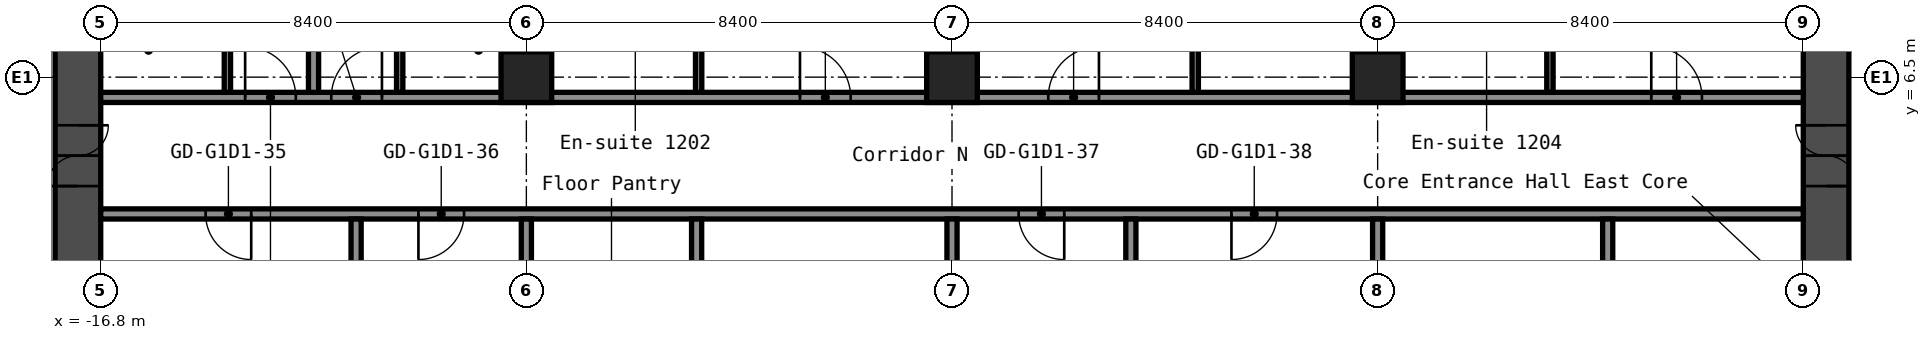
"""IFC4 building model, lengths in metres.
Left out: names, types, materials, properties, quantities, classifications, styles, units other than length and angle.
Written with IfcOpenShell. Run it as: python <this file> out.ifc"""

import sys

from ifc_helpers import new_model, si_unit, direction, frame, frame_2d, origin, origin_2d, place, context, subcontext, project, spatial, rectangle, hollow_rectangle, extrude, element, fill, save


model = new_model("IFC4")
c1 = context("Model", 3, precision=1e-05, world=origin(), true_north=direction((0.0, 1.0)))
c2 = subcontext(c1, "Body", "Model", "MODEL_VIEW")
j1 = project(units=[si_unit("LENGTHUNIT", "METRE"), si_unit("PLANEANGLEUNIT", "RADIAN")], contexts=[c1])
p1 = place(None, origin())
s1 = spatial("IfcSite", under=j1, at=p1, CompositionType="ELEMENT")
p2 = place(p1, origin())
s2 = spatial("IfcBuilding", under=s1, at=p2, CompositionType="ELEMENT")
p3 = place(p2, frame((0.0, 0.0, 45.4)))
s3 = spatial("IfcBuildingStorey", under=s2, at=p3, CompositionType="ELEMENT", Elevation=45.4)
for number, where, z_axis, x_axis in (
    (1, (-8.4, 6.5, 0.0), (0.0, 0.0, 1.0), (1.0, 0.0, 0.0)),
    (2, (0.0, 6.5, 0.0), (0.0, 0.0, 1.0), (1.0, 0.0, 0.0)),
    (3, (8.4, 6.5, 0.0), (0.0, 0.0, 1.0), (1.0, 0.0, 0.0)),
):
    element("IfcColumn", number, at=place(p3, frame(where, z_axis=z_axis, x_axis=x_axis)), inside=s3, PredefinedType="COLUMN", context=c2, shape_type="SweptSolid", body=[
        extrude(hollow_rectangle(XDim=1.0, YDim=1.0, WallThickness=0.04, at=origin_2d()), origin(), (0.0, 0.0, 1.0), 2.8),
    ])
p4 = place(p3, frame((-17.25, -8.4, 0.0), z_axis=(0.0, 0.0, 1.0), x_axis=(0.0, 1.0, 0.0)))
e4 = element("IfcWall", 4, at=p4, inside=s3, PredefinedType="SHEAR", context=c2, shape_type="SweptSolid", body=[
    extrude(rectangle(XDim=16.8, YDim=0.9, at=frame_2d((8.4, 0.0))), origin(), (0.0, 0.0, 1.0), 2.8),
])
p5 = place(p4, frame((12.75, 0.0, 0.0)))
e5 = element("IfcOpeningElement", 5, at=p5, cuts=e4, PredefinedType="OPENING", context=c2, shape_type="SweptSolid", body=[
    extrude(rectangle(XDim=1.2, YDim=2.1, at=frame_2d((0.6, 1.05))), frame((0.0, 0.46, 0.0), z_axis=(0.0, -1.0, 0.0), x_axis=(1.0, 0.0, 0.0)), (0.0, 0.0, 1.0), 0.92),
])
p6 = place(p4, frame((2.85, 0.0, 0.0)))
e6 = element("IfcOpeningElement", 6, at=p6, cuts=e4, PredefinedType="OPENING", context=c2, shape_type="SweptSolid", body=[
    extrude(rectangle(XDim=1.2, YDim=2.1, at=frame_2d((0.6, 1.05))), frame((0.0, 0.46, 0.0), z_axis=(0.0, -1.0, 0.0), x_axis=(1.0, 0.0, 0.0)), (0.0, 0.0, 1.0), 0.92),
])
p7 = place(p3, frame((17.25, -8.4, 0.0), z_axis=(0.0, 0.0, 1.0), x_axis=(0.0, 1.0, 0.0)))
e7 = element("IfcWall", 7, at=p7, inside=s3, PredefinedType="SHEAR", context=c2, shape_type="SweptSolid", body=[
    extrude(rectangle(XDim=16.8, YDim=0.9, at=frame_2d((8.4, 0.0))), origin(), (0.0, 0.0, 1.0), 2.8),
])
p8 = place(p7, frame((12.75, 0.0, 0.0)))
e8 = element("IfcOpeningElement", 8, at=p8, cuts=e7, PredefinedType="OPENING", context=c2, shape_type="SweptSolid", body=[
    extrude(rectangle(XDim=1.2, YDim=2.1, at=frame_2d((0.6, 1.05))), frame((0.0, 0.46, 0.0), z_axis=(0.0, -1.0, 0.0), x_axis=(1.0, 0.0, 0.0)), (0.0, 0.0, 1.0), 0.92),
])
p9 = place(p7, frame((2.85, 0.0, 0.0)))
e9 = element("IfcOpeningElement", 9, at=p9, cuts=e7, PredefinedType="OPENING", context=c2, shape_type="SweptSolid", body=[
    extrude(rectangle(XDim=1.2, YDim=2.1, at=frame_2d((0.6, 1.05))), frame((0.0, 0.46, 0.0), z_axis=(0.0, -1.0, 0.0), x_axis=(1.0, 0.0, 0.0)), (0.0, 0.0, 1.0), 0.92),
])
p10 = place(p3, frame((-16.8, 3.8, 0.0), z_axis=(0.0, 0.0, 1.0), x_axis=(1.0, 0.0, 0.0)))
e10 = element("IfcWall", 10, at=p10, inside=s3, PredefinedType="PARTITIONING", context=c2, shape_type="SweptSolid", body=[
    extrude(rectangle(XDim=33.6, YDim=0.2, at=frame_2d((16.8, 0.0))), origin(), (0.0, 0.0, 1.0), 2.8),
])
p11 = place(p10, frame((2.07, 0.0, 0.0)))
e11 = element("IfcOpeningElement", 11, at=p11, cuts=e10, PredefinedType="OPENING", context=c2, shape_type="SweptSolid", body=[
    extrude(rectangle(XDim=0.9, YDim=2.1, at=frame_2d((0.45, 1.05))), frame((0.0, 0.11, 0.0), z_axis=(0.0, -1.0, 0.0), x_axis=(1.0, 0.0, 0.0)), (0.0, 0.0, 1.0), 0.22),
])
p12 = place(p10, frame((6.27, 0.0, 0.0)))
e12 = element("IfcOpeningElement", 12, at=p12, cuts=e10, PredefinedType="OPENING", context=c2, shape_type="SweptSolid", body=[
    extrude(rectangle(XDim=0.9, YDim=2.1, at=frame_2d((0.45, 1.05))), frame((0.0, 0.11, 0.0), z_axis=(0.0, -1.0, 0.0), x_axis=(1.0, 0.0, 0.0)), (0.0, 0.0, 1.0), 0.22),
])
p13 = place(p10, frame((18.115, 0.0, 0.0)))
e13 = element("IfcOpeningElement", 13, at=p13, cuts=e10, PredefinedType="OPENING", context=c2, shape_type="SweptSolid", body=[
    extrude(rectangle(XDim=0.9, YDim=2.1, at=frame_2d((0.45, 1.05))), frame((0.0, 0.11, 0.0), z_axis=(0.0, -1.0, 0.0), x_axis=(1.0, 0.0, 0.0)), (0.0, 0.0, 1.0), 0.22),
])
p14 = place(p10, frame((22.315, 0.0, 0.0)))
e14 = element("IfcOpeningElement", 14, at=p14, cuts=e10, PredefinedType="OPENING", context=c2, shape_type="SweptSolid", body=[
    extrude(rectangle(XDim=0.9, YDim=2.1, at=frame_2d((0.45, 1.05))), frame((0.0, 0.11, 0.0), z_axis=(0.0, -1.0, 0.0), x_axis=(1.0, 0.0, 0.0)), (0.0, 0.0, 1.0), 0.22),
])
p15 = place(p3, frame((-16.8, 6.1, 0.0), z_axis=(0.0, 0.0, 1.0), x_axis=(1.0, 0.0, 0.0)))
e15 = element("IfcWall", 15, at=p15, inside=s3, PredefinedType="PARTITIONING", context=c2, shape_type="SweptSolid", body=[
    extrude(rectangle(XDim=33.6, YDim=0.2, at=frame_2d((16.8, 0.0))), origin(), (0.0, 0.0, 1.0), 2.8),
])
p16 = place(p15, frame((2.85, 0.0, 0.0)))
e16 = element("IfcOpeningElement", 16, at=p16, cuts=e15, PredefinedType="OPENING", context=c2, shape_type="SweptSolid", body=[
    extrude(rectangle(XDim=1.0, YDim=2.1, at=frame_2d((0.5, 1.05))), frame((0.0, 0.11, 0.0), z_axis=(0.0, -1.0, 0.0), x_axis=(1.0, 0.0, 0.0)), (0.0, 0.0, 1.0), 0.22),
])
p17 = place(p15, frame((4.55, 0.0, 0.0)))
e17 = element("IfcOpeningElement", 17, at=p17, cuts=e15, PredefinedType="OPENING", context=c2, shape_type="SweptSolid", body=[
    extrude(rectangle(XDim=1.0, YDim=2.1, at=frame_2d((0.5, 1.05))), frame((0.0, 0.11, 0.0), z_axis=(0.0, -1.0, 0.0), x_axis=(1.0, 0.0, 0.0)), (0.0, 0.0, 1.0), 0.22),
])
p18 = place(p15, frame((13.8, 0.0, 0.0)))
e18 = element("IfcOpeningElement", 18, at=p18, cuts=e15, PredefinedType="OPENING", context=c2, shape_type="SweptSolid", body=[
    extrude(rectangle(XDim=1.0, YDim=2.1, at=frame_2d((0.5, 1.05))), frame((0.0, 0.11, 0.0), z_axis=(0.0, -1.0, 0.0), x_axis=(1.0, 0.0, 0.0)), (0.0, 0.0, 1.0), 0.22),
])
p19 = place(p15, frame((18.7, 0.0, 0.0)))
e19 = element("IfcOpeningElement", 19, at=p19, cuts=e15, PredefinedType="OPENING", context=c2, shape_type="SweptSolid", body=[
    extrude(rectangle(XDim=1.0, YDim=2.1, at=frame_2d((0.5, 1.05))), frame((0.0, 0.11, 0.0), z_axis=(0.0, -1.0, 0.0), x_axis=(1.0, 0.0, 0.0)), (0.0, 0.0, 1.0), 0.22),
])
p20 = place(p15, frame((30.6, 0.0, 0.0)))
e20 = element("IfcOpeningElement", 20, at=p20, cuts=e15, PredefinedType="OPENING", context=c2, shape_type="SweptSolid", body=[
    extrude(rectangle(XDim=1.0, YDim=2.1, at=frame_2d((0.5, 1.05))), frame((0.0, 0.11, 0.0), z_axis=(0.0, -1.0, 0.0), x_axis=(1.0, 0.0, 0.0)), (0.0, 0.0, 1.0), 0.22),
])
p21 = place(p3, frame((-14.3, 6.2, 0.0), z_axis=(0.0, 0.0, 1.0), x_axis=(0.0, 1.0, 0.0)))
e21 = element("IfcWall", 21, at=p21, inside=s3, PredefinedType="PARTITIONING", context=c2, shape_type="SweptSolid", body=[
    extrude(rectangle(XDim=2.9, YDim=0.125, at=frame_2d((1.45, 0.0))), origin(), (0.0, 0.0, 1.0), 2.8),
])
p22 = place(p21, frame((1.5, 0.0, 0.0)))
e22 = element("IfcOpeningElement", 22, at=p22, cuts=e21, PredefinedType="OPENING", context=c2, shape_type="SweptSolid", body=[
    extrude(rectangle(XDim=0.8, YDim=2.1, at=frame_2d((0.4, 1.05))), frame((0.0, 0.073, 0.0), z_axis=(0.0, -1.0, 0.0), x_axis=(1.0, 0.0, 0.0)), (0.0, 0.0, 1.0), 0.145),
])
p23 = place(p3, frame((-12.6, 6.2, 0.0), z_axis=(0.0, 0.0, 1.0), x_axis=(0.0, 1.0, 0.0)))
e23 = element("IfcWall", 23, at=p23, inside=s3, PredefinedType="PARTITIONING", context=c2, shape_type="SweptSolid", body=[
    extrude(rectangle(XDim=14.1, YDim=0.2, at=frame_2d((7.05, 0.0))), origin(), (0.0, 0.0, 1.0), 2.8),
])
p24 = place(p3, frame((-11.76, -3.7, 0.0), z_axis=(0.0, 0.0, 1.0), x_axis=(0.0, 1.0, 0.0)))
e24 = element("IfcWall", 24, at=p24, inside=s3, PredefinedType="PARTITIONING", context=c2, shape_type="SweptSolid", body=[
    extrude(rectangle(XDim=7.4, YDim=0.2, at=frame_2d((3.7, 0.0))), origin(), (0.0, 0.0, 1.0), 2.8),
])
p25 = place(p3, frame((-10.9, 6.2, 0.0), z_axis=(0.0, 0.0, 1.0), x_axis=(0.0, 1.0, 0.0)))
e25 = element("IfcWall", 25, at=p25, inside=s3, PredefinedType="PARTITIONING", context=c2, shape_type="SweptSolid", body=[
    extrude(rectangle(XDim=2.9, YDim=0.125, at=frame_2d((1.45, 0.0))), origin(), (0.0, 0.0, 1.0), 2.8),
])
p26 = place(p25, frame((1.5, 0.0, 0.0)))
e26 = element("IfcOpeningElement", 26, at=p26, cuts=e25, PredefinedType="OPENING", context=c2, shape_type="SweptSolid", body=[
    extrude(rectangle(XDim=0.8, YDim=2.1, at=frame_2d((0.4, 1.05))), frame((0.0, 0.073, 0.0), z_axis=(0.0, -1.0, 0.0), x_axis=(1.0, 0.0, 0.0)), (0.0, 0.0, 1.0), 0.145),
])
p27 = place(p3, frame((-8.4, -3.7, 0.0), z_axis=(0.0, 0.0, 1.0), x_axis=(0.0, 1.0, 0.0)))
e27 = element("IfcWall", 27, at=p27, inside=s3, PredefinedType="PARTITIONING", context=c2, shape_type="SweptSolid", body=[
    extrude(rectangle(XDim=7.4, YDim=0.2, at=frame_2d((3.7, 0.0))), origin(), (0.0, 0.0, 1.0), 2.8),
])
p28 = place(p3, frame((-8.4, 6.99, 0.0), z_axis=(0.0, 0.0, 1.0), x_axis=(0.0, 1.0, 0.0)))
e28 = element("IfcWall", 28, at=p28, inside=s3, PredefinedType="PARTITIONING", context=c2, shape_type="SweptSolid", body=[
    extrude(rectangle(XDim=13.31, YDim=0.2, at=frame_2d((6.655, 0.0))), origin(), (0.0, 0.0, 1.0), 2.8),
])
p29 = place(p3, frame((-5.04, -3.7, 0.0), z_axis=(0.0, 0.0, 1.0), x_axis=(0.0, 1.0, 0.0)))
e29 = element("IfcWall", 29, at=p29, inside=s3, PredefinedType="PARTITIONING", context=c2, shape_type="SweptSolid", body=[
    extrude(rectangle(XDim=7.4, YDim=0.2, at=frame_2d((3.7, 0.0))), origin(), (0.0, 0.0, 1.0), 2.8),
])
p30 = place(p3, frame((-5.0, 6.2, 0.0), z_axis=(0.0, 0.0, 1.0), x_axis=(0.0, 1.0, 0.0)))
e30 = element("IfcWall", 30, at=p30, inside=s3, PredefinedType="PARTITIONING", context=c2, shape_type="SweptSolid", body=[
    extrude(rectangle(XDim=3.3, YDim=0.125, at=frame_2d((1.65, 0.0))), origin(), (0.0, 0.0, 1.0), 2.8),
])
p31 = place(p3, frame((0.0, -3.7, 0.0), z_axis=(0.0, 0.0, 1.0), x_axis=(0.0, 1.0, 0.0)))
e31 = element("IfcWall", 31, at=p31, inside=s3, PredefinedType="PARTITIONING", context=c2, shape_type="SweptSolid", body=[
    extrude(rectangle(XDim=7.4, YDim=0.2, at=frame_2d((3.7, 0.0))), origin(), (0.0, 0.0, 1.0), 2.8),
])
p32 = place(p3, frame((0.0, 6.99, 0.0), z_axis=(0.0, 0.0, 1.0), x_axis=(0.0, 1.0, 0.0)))
e32 = element("IfcWall", 32, at=p32, inside=s3, PredefinedType="PARTITIONING", context=c2, shape_type="SweptSolid", body=[
    extrude(rectangle(XDim=13.31, YDim=0.2, at=frame_2d((6.655, 0.0))), origin(), (0.0, 0.0, 1.0), 2.8),
])
p33 = place(p3, frame((3.53, -3.7, 0.0), z_axis=(0.0, 0.0, 1.0), x_axis=(0.0, 1.0, 0.0)))
e33 = element("IfcWall", 33, at=p33, inside=s3, PredefinedType="PARTITIONING", context=c2, shape_type="SweptSolid", body=[
    extrude(rectangle(XDim=7.4, YDim=0.2, at=frame_2d((3.7, 0.0))), origin(), (0.0, 0.0, 1.0), 2.8),
])
p34 = place(p3, frame((4.8, 6.2, 0.0), z_axis=(0.0, 0.0, 1.0), x_axis=(0.0, 1.0, 0.0)))
e34 = element("IfcWall", 34, at=p34, inside=s3, PredefinedType="PARTITIONING", context=c2, shape_type="SweptSolid", body=[
    extrude(rectangle(XDim=3.3, YDim=0.125, at=frame_2d((1.65, 0.0))), origin(), (0.0, 0.0, 1.0), 2.8),
])
p35 = place(p34, frame((1.1, 0.0, 0.0)))
e35 = element("IfcOpeningElement", 35, at=p35, cuts=e34, PredefinedType="OPENING", context=c2, shape_type="SweptSolid", body=[
    extrude(rectangle(XDim=1.0, YDim=2.1, at=frame_2d((0.5, 1.05))), frame((0.0, 0.073, 0.0), z_axis=(0.0, -1.0, 0.0), x_axis=(1.0, 0.0, 0.0)), (0.0, 0.0, 1.0), 0.145),
])
p36 = place(p3, frame((8.4, -3.7, 0.0), z_axis=(0.0, 0.0, 1.0), x_axis=(0.0, 1.0, 0.0)))
e36 = element("IfcWall", 36, at=p36, inside=s3, PredefinedType="PARTITIONING", context=c2, shape_type="SweptSolid", body=[
    extrude(rectangle(XDim=7.4, YDim=0.2, at=frame_2d((3.7, 0.0))), origin(), (0.0, 0.0, 1.0), 2.8),
])
p37 = place(p3, frame((8.4, 6.99, 0.0), z_axis=(0.0, 0.0, 1.0), x_axis=(0.0, 1.0, 0.0)))
e37 = element("IfcWall", 37, at=p37, inside=s3, PredefinedType="PARTITIONING", context=c2, shape_type="SweptSolid", body=[
    extrude(rectangle(XDim=13.31, YDim=0.2, at=frame_2d((6.655, 0.0))), origin(), (0.0, 0.0, 1.0), 2.8),
])
p38 = place(p3, frame((11.8, 6.2, 0.0), z_axis=(0.0, 0.0, 1.0), x_axis=(0.0, 1.0, 0.0)))
e38 = element("IfcWall", 38, at=p38, inside=s3, PredefinedType="PARTITIONING", context=c2, shape_type="SweptSolid", body=[
    extrude(rectangle(XDim=3.3, YDim=0.125, at=frame_2d((1.65, 0.0))), origin(), (0.0, 0.0, 1.0), 2.8),
])
p39 = place(p3, frame((12.94, -3.7, 0.0), z_axis=(0.0, 0.0, 1.0), x_axis=(0.0, 1.0, 0.0)))
e39 = element("IfcWall", 39, at=p39, inside=s3, PredefinedType="PARTITIONING", context=c2, shape_type="SweptSolid", body=[
    extrude(rectangle(XDim=7.4, YDim=0.2, at=frame_2d((3.7, 0.0))), origin(), (0.0, 0.0, 1.0), 2.8),
])
p40 = place(p5, origin())
e40 = element("IfcDoor", 40, at=p40, inside=s3, OperationType="DOUBLE_DOOR_SINGLE_SWING", PredefinedType="DOOR", context=c2, shape_type="SweptSolid", body=[
    extrude(rectangle(XDim=1.2, YDim=2.1, at=frame_2d((0.6, 1.05))), frame((0.0, 0.025, 0.0), z_axis=(0.0, -1.0, 0.0), x_axis=(1.0, 0.0, 0.0)), (0.0, 0.0, 1.0), 0.05),
])
fill(e5, e40)
p41 = place(p8, origin())
e41 = element("IfcDoor", 41, at=p41, inside=s3, OperationType="DOUBLE_DOOR_SINGLE_SWING", PredefinedType="DOOR", context=c2, shape_type="SweptSolid", body=[
    extrude(rectangle(XDim=1.2, YDim=2.1, at=frame_2d((0.6, 1.05))), frame((0.0, 0.025, 0.0), z_axis=(0.0, -1.0, 0.0), x_axis=(1.0, 0.0, 0.0)), (0.0, 0.0, 1.0), 0.05),
])
fill(e8, e41)
p42 = place(p11, origin())
e42 = element("IfcDoor", 42, at=p42, inside=s3, OperationType="SINGLE_SWING_RIGHT", PredefinedType="DOOR", context=c2, shape_type="SweptSolid", body=[
    extrude(rectangle(XDim=0.9, YDim=2.1, at=frame_2d((0.45, 1.05))), frame((0.0, 0.025, 0.0), z_axis=(0.0, -1.0, 0.0), x_axis=(1.0, 0.0, 0.0)), (0.0, 0.0, 1.0), 0.05),
])
fill(e11, e42)
p43 = place(p12, origin())
e43 = element("IfcDoor", 43, at=p43, inside=s3, OperationType="SINGLE_SWING_LEFT", PredefinedType="DOOR", context=c2, shape_type="SweptSolid", body=[
    extrude(rectangle(XDim=0.9, YDim=2.1, at=frame_2d((0.45, 1.05))), frame((0.0, 0.025, 0.0), z_axis=(0.0, -1.0, 0.0), x_axis=(1.0, 0.0, 0.0)), (0.0, 0.0, 1.0), 0.05),
])
fill(e12, e43)
p44 = place(p13, origin())
e44 = element("IfcDoor", 44, at=p44, inside=s3, OperationType="SINGLE_SWING_RIGHT", PredefinedType="DOOR", context=c2, shape_type="SweptSolid", body=[
    extrude(rectangle(XDim=0.9, YDim=2.1, at=frame_2d((0.45, 1.05))), frame((0.0, 0.025, 0.0), z_axis=(0.0, -1.0, 0.0), x_axis=(1.0, 0.0, 0.0)), (0.0, 0.0, 1.0), 0.05),
])
fill(e13, e44)
p45 = place(p14, origin())
e45 = element("IfcDoor", 45, at=p45, inside=s3, OperationType="SINGLE_SWING_LEFT", PredefinedType="DOOR", context=c2, shape_type="SweptSolid", body=[
    extrude(rectangle(XDim=0.9, YDim=2.1, at=frame_2d((0.45, 1.05))), frame((0.0, 0.025, 0.0), z_axis=(0.0, -1.0, 0.0), x_axis=(1.0, 0.0, 0.0)), (0.0, 0.0, 1.0), 0.05),
])
fill(e14, e45)
p46 = place(p16, origin())
e46 = element("IfcDoor", 46, at=p46, inside=s3, OperationType="SINGLE_SWING_RIGHT", PredefinedType="DOOR", context=c2, shape_type="SweptSolid", body=[
    extrude(rectangle(XDim=1.0, YDim=2.1, at=frame_2d((0.5, 1.05))), frame((0.0, 0.025, 0.0), z_axis=(0.0, -1.0, 0.0), x_axis=(1.0, 0.0, 0.0)), (0.0, 0.0, 1.0), 0.05),
])
fill(e16, e46)
p47 = place(p17, origin())
e47 = element("IfcDoor", 47, at=p47, inside=s3, OperationType="SINGLE_SWING_LEFT", PredefinedType="DOOR", context=c2, shape_type="SweptSolid", body=[
    extrude(rectangle(XDim=1.0, YDim=2.1, at=frame_2d((0.5, 1.05))), frame((0.0, 0.025, 0.0), z_axis=(0.0, -1.0, 0.0), x_axis=(1.0, 0.0, 0.0)), (0.0, 0.0, 1.0), 0.05),
])
fill(e17, e47)
p48 = place(p18, origin())
e48 = element("IfcDoor", 48, at=p48, inside=s3, OperationType="SINGLE_SWING_RIGHT", PredefinedType="DOOR", context=c2, shape_type="SweptSolid", body=[
    extrude(rectangle(XDim=1.0, YDim=2.1, at=frame_2d((0.5, 1.05))), frame((0.0, 0.025, 0.0), z_axis=(0.0, -1.0, 0.0), x_axis=(1.0, 0.0, 0.0)), (0.0, 0.0, 1.0), 0.05),
])
fill(e18, e48)
p49 = place(p19, origin())
e49 = element("IfcDoor", 49, at=p49, inside=s3, OperationType="SINGLE_SWING_LEFT", PredefinedType="DOOR", context=c2, shape_type="SweptSolid", body=[
    extrude(rectangle(XDim=1.0, YDim=2.1, at=frame_2d((0.5, 1.05))), frame((0.0, 0.025, 0.0), z_axis=(0.0, -1.0, 0.0), x_axis=(1.0, 0.0, 0.0)), (0.0, 0.0, 1.0), 0.05),
])
fill(e19, e49)
p50 = place(p20, origin())
e50 = element("IfcDoor", 50, at=p50, inside=s3, OperationType="SINGLE_SWING_RIGHT", PredefinedType="DOOR", context=c2, shape_type="SweptSolid", body=[
    extrude(rectangle(XDim=1.0, YDim=2.1, at=frame_2d((0.5, 1.05))), frame((0.0, 0.025, 0.0), z_axis=(0.0, -1.0, 0.0), x_axis=(1.0, 0.0, 0.0)), (0.0, 0.0, 1.0), 0.05),
])
fill(e20, e50)
save(model, sys.argv[1])
